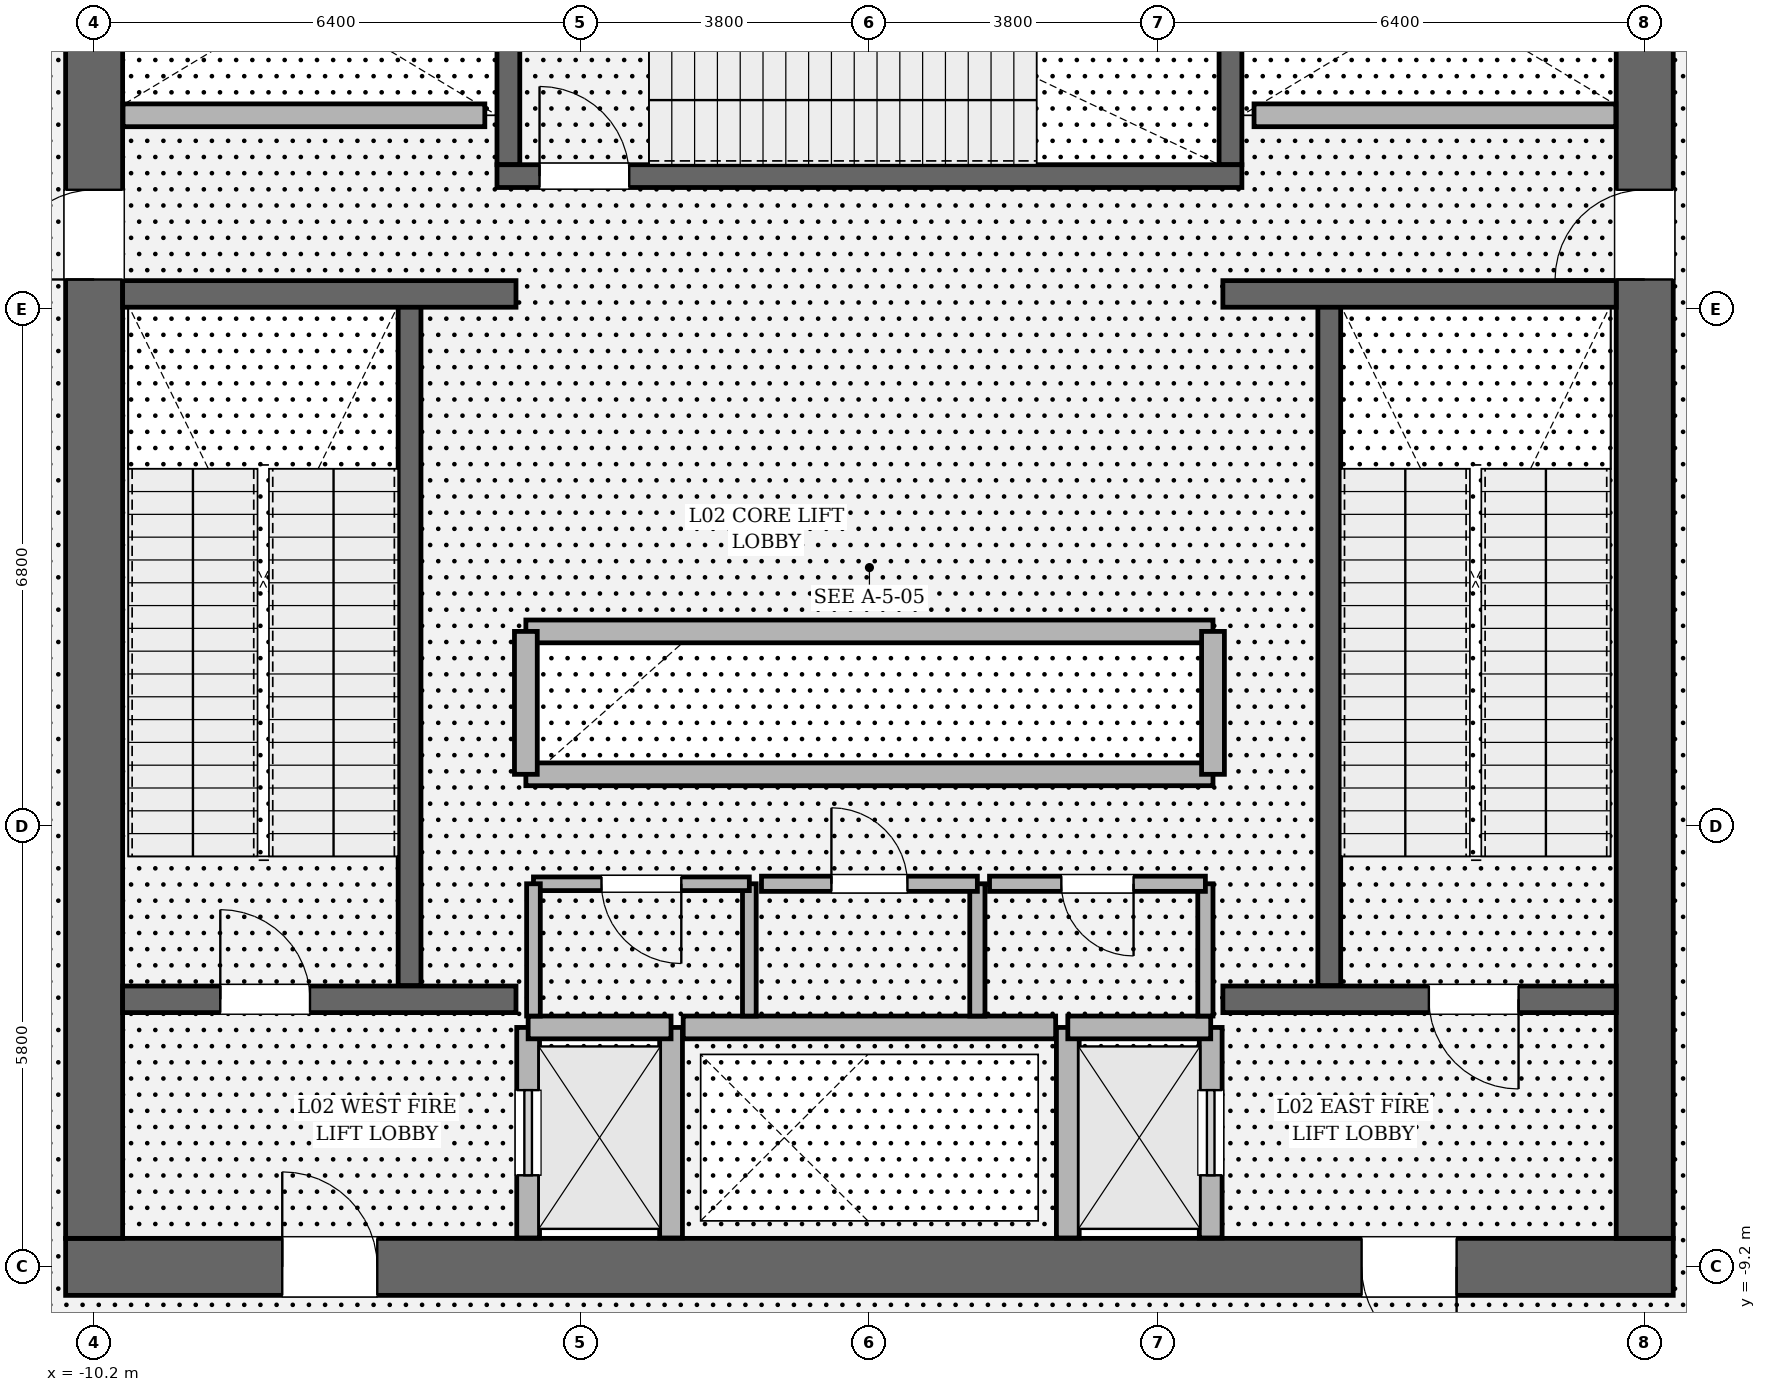
"""IFC4 building model, lengths in metres.
Left out: names, types, materials, properties, quantities, classifications, styles, units other than length and angle.
Written with IfcOpenShell. Run it as: python <this file> out.ifc"""

import sys

from ifc_helpers import new_model, si_unit, direction, frame, frame_2d, origin, place, context, subcontext, project, spatial, rectangle, extrude, element, fill, save


model = new_model("IFC4")
c1 = context("Model", 3, precision=1e-05, world=origin(), true_north=direction((0.0, 1.0)))
c2 = subcontext(c1, "Body", "Model", "MODEL_VIEW")
j1 = project(units=[si_unit("LENGTHUNIT", "METRE"), si_unit("PLANEANGLEUNIT", "RADIAN")], contexts=[c1])
p1 = place(None, origin())
s1 = spatial("IfcSite", under=j1, at=p1, CompositionType="ELEMENT")
p2 = place(p1, origin())
s2 = spatial("IfcBuilding", under=s1, at=p2, CompositionType="ELEMENT")
p3 = place(p2, frame((0.0, 0.0, 11.4)))
s3 = spatial("IfcBuildingStorey", under=s2, at=p3, CompositionType="ELEMENT", Elevation=11.4)
p4 = place(p3, frame((10.575, -9.2, 0.0), z_axis=(0.0, 0.0, 1.0), x_axis=(-1.0, 0.0, 0.0)))
e1 = element("IfcWall", 1, at=p4, inside=s3, PredefinedType="SHEAR", context=c2, shape_type="SweptSolid", body=[
    extrude(rectangle(XDim=21.15, YDim=0.75, at=frame_2d((10.575, 0.0))), origin(), (0.0, 0.0, 1.0), 5.4),
])
p5 = place(p4, frame((2.85, 0.0, 0.0)))
e2 = element("IfcOpeningElement", 2, at=p5, cuts=e1, PredefinedType="OPENING", context=c2, shape_type="SweptSolid", body=[
    extrude(rectangle(XDim=1.25, YDim=2.25, at=frame_2d((0.625, 1.125))), frame((0.0, 0.385, 0.0), z_axis=(0.0, -1.0, 0.0), x_axis=(1.0, 0.0, 0.0)), (0.0, 0.0, 1.0), 0.77),
])
p6 = place(p4, frame((17.05, 0.0, 0.0)))
e3 = element("IfcOpeningElement", 3, at=p6, cuts=e1, PredefinedType="OPENING", context=c2, shape_type="SweptSolid", body=[
    extrude(rectangle(XDim=1.25, YDim=2.25, at=frame_2d((0.625, 1.125))), frame((0.0, 0.385, 0.0), z_axis=(0.0, -1.0, 0.0), x_axis=(1.0, 0.0, 0.0)), (0.0, 0.0, 1.0), 0.77),
])
p7 = place(p3, frame((-10.2, -8.825, 0.0), z_axis=(0.0, 0.0, 1.0), x_axis=(0.0, 1.0, 0.0)))
e4 = element("IfcWall", 4, at=p7, inside=s3, PredefinedType="SHEAR", context=c2, shape_type="SweptSolid", body=[
    extrude(rectangle(XDim=17.65, YDim=0.75, at=frame_2d((8.825, 0.0))), origin(), (0.0, 0.0, 1.0), 5.4),
])
p8 = place(p7, frame((12.615, 0.0, 0.0)))
e5 = element("IfcOpeningElement", 5, at=p8, cuts=e4, PredefinedType="OPENING", context=c2, shape_type="SweptSolid", body=[
    extrude(rectangle(XDim=1.18, YDim=2.2, at=frame_2d((0.59, 1.1))), frame((0.0, 0.385, 0.0), z_axis=(0.0, -1.0, 0.0), x_axis=(1.0, 0.0, 0.0)), (0.0, 0.0, 1.0), 0.77),
])
p9 = place(p3, frame((10.2, 8.825, 0.0), z_axis=(0.0, 0.0, 1.0), x_axis=(0.0, -1.0, 0.0)))
e6 = element("IfcWall", 6, at=p9, inside=s3, PredefinedType="SHEAR", context=c2, shape_type="SweptSolid", body=[
    extrude(rectangle(XDim=17.65, YDim=0.75, at=frame_2d((8.825, 0.0))), origin(), (0.0, 0.0, 1.0), 5.4),
])
p10 = place(p9, frame((3.855, 0.0, 0.0)))
e7 = element("IfcOpeningElement", 7, at=p10, cuts=e6, PredefinedType="OPENING", context=c2, shape_type="SweptSolid", body=[
    extrude(rectangle(XDim=1.18, YDim=2.2, at=frame_2d((0.59, 1.1))), frame((0.0, 0.385, 0.0), z_axis=(0.0, -1.0, 0.0), x_axis=(1.0, 0.0, 0.0)), (0.0, 0.0, 1.0), 0.77),
])
for number, where, z_axis, x_axis in (
    (8, (-6.05, -5.5, 0.0), (0.0, 0.0, 1.0), (0.0, 1.0, 0.0)),
    (9, (6.05, 3.45, 0.0), (0.0, 0.0, 1.0), (0.0, -1.0, 0.0)),
):
    element("IfcWall", number, at=place(p3, frame(where, z_axis=z_axis, x_axis=x_axis)), inside=s3, PredefinedType="SOLIDWALL", context=c2, shape_type="SweptSolid", body=[
        extrude(rectangle(XDim=8.95, YDim=0.3, at=frame_2d((4.475, 0.0))), origin(), (0.0, 0.0, 1.0), 5.4),
    ])
for number, where, z_axis, x_axis in (
    (10, (-4.75, 5.3, 0.0), (0.0, 0.0, 1.0), (0.0, 1.0, 0.0)),
    (11, (4.75, 8.825, 0.0), (0.0, 0.0, 1.0), (0.0, -1.0, 0.0)),
):
    element("IfcWall", number, at=place(p3, frame(where, z_axis=z_axis, x_axis=x_axis)), inside=s3, PredefinedType="SOLIDWALL", context=c2, shape_type="SweptSolid", body=[
        extrude(rectangle(XDim=3.525, YDim=0.3, at=frame_2d((1.762, 0.0))), origin(), (0.0, 0.0, 1.0), 5.4),
    ])
p11 = place(p3, frame((-4.9, 5.15, 0.0), z_axis=(0.0, 0.0, 1.0), x_axis=(1.0, 0.0, 0.0)))
e12 = element("IfcWall", 12, at=p11, inside=s3, PredefinedType="SOLIDWALL", context=c2, shape_type="SweptSolid", body=[
    extrude(rectangle(XDim=9.8, YDim=0.3, at=frame_2d((4.9, 0.0))), origin(), (0.0, 0.0, 1.0), 5.4),
])
p12 = place(p11, frame((0.56, 0.0, 0.0)))
e13 = element("IfcOpeningElement", 13, at=p12, cuts=e12, PredefinedType="OPENING", context=c2, shape_type="SweptSolid", body=[
    extrude(rectangle(XDim=1.18, YDim=2.2, at=frame_2d((0.59, 1.1))), frame((0.0, 0.16, 0.0), z_axis=(0.0, -1.0, 0.0), x_axis=(1.0, 0.0, 0.0)), (0.0, 0.0, 1.0), 0.32),
])
p13 = place(p3, frame((-9.825, -5.68, 0.0), z_axis=(0.0, 0.0, 1.0), x_axis=(1.0, 0.0, 0.0)))
e14 = element("IfcWall", 14, at=p13, inside=s3, PredefinedType="SOLIDWALL", context=c2, shape_type="SweptSolid", body=[
    extrude(rectangle(XDim=5.175, YDim=0.35, at=frame_2d((2.587, 0.0))), origin(), (0.0, 0.0, 1.0), 5.4),
])
p14 = place(p13, frame((1.285, 0.0, 0.0)))
e15 = element("IfcOpeningElement", 15, at=p14, cuts=e14, PredefinedType="OPENING", context=c2, shape_type="SweptSolid", body=[
    extrude(rectangle(XDim=1.18, YDim=2.2, at=frame_2d((0.59, 1.1))), frame((0.0, 0.185, 0.0), z_axis=(0.0, -1.0, 0.0), x_axis=(1.0, 0.0, 0.0)), (0.0, 0.0, 1.0), 0.37),
])
p15 = place(p3, frame((4.65, -5.68, 0.0), z_axis=(0.0, 0.0, 1.0), x_axis=(1.0, 0.0, 0.0)))
e16 = element("IfcWall", 16, at=p15, inside=s3, PredefinedType="SOLIDWALL", context=c2, shape_type="SweptSolid", body=[
    extrude(rectangle(XDim=5.175, YDim=0.35, at=frame_2d((2.587, 0.0))), origin(), (0.0, 0.0, 1.0), 5.4),
])
p16 = place(p15, frame((2.71, 0.0, 0.0)))
e17 = element("IfcOpeningElement", 17, at=p16, cuts=e16, PredefinedType="OPENING", context=c2, shape_type="SweptSolid", body=[
    extrude(rectangle(XDim=1.18, YDim=2.2, at=frame_2d((0.59, 1.1))), frame((0.0, 0.185, 0.0), z_axis=(0.0, -1.0, 0.0), x_axis=(1.0, 0.0, 0.0)), (0.0, 0.0, 1.0), 0.37),
])
for number, where, z_axis, x_axis in (
    (18, (-9.825, 3.6, 0.0), (0.0, 0.0, 1.0), (1.0, 0.0, 0.0)),
    (19, (4.65, 3.6, 0.0), (0.0, 0.0, 1.0), (1.0, 0.0, 0.0)),
):
    element("IfcWall", number, at=place(p3, frame(where, z_axis=z_axis, x_axis=x_axis)), inside=s3, PredefinedType="SOLIDWALL", context=c2, shape_type="SweptSolid", body=[
        extrude(rectangle(XDim=5.175, YDim=0.35, at=frame_2d((2.587, 0.0))), origin(), (0.0, 0.0, 1.0), 5.4),
    ])
p17 = place(p3, frame((-4.49, -8.82, 0.0), z_axis=(0.0, 0.0, 1.0), x_axis=(0.0, 1.0, 0.0)))
e20 = element("IfcWall", 20, at=p17, inside=s3, PredefinedType="SOLIDWALL", context=c2, shape_type="SweptSolid", body=[
    extrude(rectangle(XDim=2.77, YDim=0.3, at=frame_2d((1.385, 0.0))), origin(), (0.0, 0.0, 1.0), 5.12),
])
p18 = place(p17, frame((0.825, 0.0, 0.0)))
e21 = element("IfcOpeningElement", 21, at=p18, cuts=e20, PredefinedType="OPENING", context=c2, shape_type="SweptSolid", body=[
    extrude(rectangle(XDim=1.12, YDim=2.25, at=frame_2d((0.56, 1.125))), frame((0.0, 0.16, 0.0), z_axis=(0.0, -1.0, 0.0), x_axis=(1.0, 0.0, 0.0)), (0.0, 0.0, 1.0), 0.32),
])
p19 = place(p3, frame((-2.61, -8.82, 0.0), z_axis=(0.0, 0.0, 1.0), x_axis=(0.0, 1.0, 0.0)))
e22 = element("IfcWall", 22, at=p19, inside=s3, PredefinedType="SOLIDWALL", context=c2, shape_type="SweptSolid", body=[
    extrude(rectangle(XDim=2.77, YDim=0.3, at=frame_2d((1.385, 0.0))), origin(), (0.0, 0.0, 1.0), 5.12),
])
p20 = place(p3, frame((-4.49, -6.05, 0.0), z_axis=(0.0, 0.0, 1.0), x_axis=(1.0, 0.0, 0.0)))
e23 = element("IfcWall", 23, at=p20, inside=s3, PredefinedType="SOLIDWALL", context=c2, shape_type="SweptSolid", body=[
    extrude(rectangle(XDim=1.88, YDim=0.3, at=frame_2d((0.94, 0.0))), origin(), (0.0, 0.0, 1.0), 5.12),
])
p21 = place(p3, frame((4.49, -8.82, 0.0), z_axis=(0.0, 0.0, 1.0), x_axis=(0.0, 1.0, 0.0)))
e24 = element("IfcWall", 24, at=p21, inside=s3, PredefinedType="SOLIDWALL", context=c2, shape_type="SweptSolid", body=[
    extrude(rectangle(XDim=2.77, YDim=0.3, at=frame_2d((1.385, 0.0))), origin(), (0.0, 0.0, 1.0), 5.12),
])
p22 = place(p21, frame((0.825, 0.0, 0.0)))
e25 = element("IfcOpeningElement", 25, at=p22, cuts=e24, PredefinedType="OPENING", context=c2, shape_type="SweptSolid", body=[
    extrude(rectangle(XDim=1.12, YDim=2.25, at=frame_2d((0.56, 1.125))), frame((0.0, 0.16, 0.0), z_axis=(0.0, -1.0, 0.0), x_axis=(1.0, 0.0, 0.0)), (0.0, 0.0, 1.0), 0.32),
])
p23 = place(p3, frame((2.61, -8.82, 0.0), z_axis=(0.0, 0.0, 1.0), x_axis=(0.0, 1.0, 0.0)))
e26 = element("IfcWall", 26, at=p23, inside=s3, PredefinedType="SOLIDWALL", context=c2, shape_type="SweptSolid", body=[
    extrude(rectangle(XDim=2.77, YDim=0.3, at=frame_2d((1.385, 0.0))), origin(), (0.0, 0.0, 1.0), 5.12),
])
p24 = place(p3, frame((2.61, -6.05, 0.0), z_axis=(0.0, 0.0, 1.0), x_axis=(1.0, 0.0, 0.0)))
e27 = element("IfcWall", 27, at=p24, inside=s3, PredefinedType="SOLIDWALL", context=c2, shape_type="SweptSolid", body=[
    extrude(rectangle(XDim=1.88, YDim=0.3, at=frame_2d((0.94, 0.0))), origin(), (0.0, 0.0, 1.0), 5.12),
])
for number, where, z_axis, x_axis in (
    (28, (-4.52, -0.84, 0.0), (0.0, 0.0, 1.0), (1.0, 0.0, 0.0)),
    (29, (-4.52, -2.72, 0.0), (0.0, 0.0, 1.0), (1.0, 0.0, 0.0)),
):
    element("IfcWall", number, at=place(p3, frame(where, z_axis=z_axis, x_axis=x_axis)), inside=s3, PredefinedType="SOLIDWALL", context=c2, shape_type="SweptSolid", body=[
        extrude(rectangle(XDim=9.04, YDim=0.3, at=frame_2d((4.52, 0.0))), origin(), (0.0, 0.0, 1.0), 5.12),
    ])
for number, where, z_axis, x_axis in (
    (30, (-4.52, -2.72, 0.0), (0.0, 0.0, 1.0), (0.0, 1.0, 0.0)),
    (31, (4.52, -2.72, 0.0), (0.0, 0.0, 1.0), (0.0, 1.0, 0.0)),
):
    element("IfcWall", number, at=place(p3, frame(where, z_axis=z_axis, x_axis=x_axis)), inside=s3, PredefinedType="SOLIDWALL", context=c2, shape_type="SweptSolid", body=[
        extrude(rectangle(XDim=1.88, YDim=0.3, at=frame_2d((0.94, 0.0))), origin(), (0.0, 0.0, 1.0), 5.12),
    ])
for number, where, z_axis, x_axis in (
    (32, (-9.82, 5.95, 0.0), (0.0, 0.0, 1.0), (1.0, 0.0, 0.0)),
    (33, (5.06, 5.95, 0.0), (0.0, 0.0, 1.0), (1.0, 0.0, 0.0)),
):
    element("IfcWall", number, at=place(p3, frame(where, z_axis=z_axis, x_axis=x_axis)), inside=s3, PredefinedType="SOLIDWALL", context=c2, shape_type="SweptSolid", body=[
        extrude(rectangle(XDim=4.76, YDim=0.3, at=frame_2d((2.38, 0.0))), origin(), (0.0, 0.0, 1.0), 5.12),
    ])
p25 = place(p3, frame((-2.45, -6.05, 0.0), z_axis=(0.0, 0.0, 1.0), x_axis=(1.0, 0.0, 0.0)))
e34 = element("IfcWall", 34, at=p25, inside=s3, PredefinedType="SOLIDWALL", context=c2, shape_type="SweptSolid", body=[
    extrude(rectangle(XDim=4.9, YDim=0.3, at=frame_2d((2.45, 0.0))), origin(), (0.0, 0.0, 1.0), 5.12),
])
p26 = place(p3, frame((-1.58, -5.9, 0.0), z_axis=(0.0, 0.0, 1.0), x_axis=(0.0, 1.0, 0.0)))
e35 = element("IfcWall", 35, at=p26, inside=s3, PredefinedType="PARTITIONING", context=c2, shape_type="SweptSolid", body=[
    extrude(rectangle(XDim=1.74, YDim=0.18, at=frame_2d((0.87, 0.0))), origin(), (0.0, 0.0, 1.0), 5.12),
])
p27 = place(p3, frame((-1.58, -4.16, 0.0), z_axis=(0.0, 0.0, 1.0), x_axis=(-1.0, 0.0, 0.0)))
e36 = element("IfcWall", 36, at=p27, inside=s3, PredefinedType="PARTITIONING", context=c2, shape_type="SweptSolid", body=[
    extrude(rectangle(XDim=2.84, YDim=0.18, at=frame_2d((1.42, 0.0))), origin(), (0.0, 0.0, 1.0), 5.12),
])
p28 = place(p27, frame((0.895, 0.0, 0.0)))
e37 = element("IfcOpeningElement", 37, at=p28, cuts=e36, PredefinedType="OPENING", context=c2, shape_type="SweptSolid", body=[
    extrude(rectangle(XDim=1.05, YDim=2.2, at=frame_2d((0.525, 1.1))), frame((0.0, 0.1, 0.0), z_axis=(0.0, -1.0, 0.0), x_axis=(1.0, 0.0, 0.0)), (0.0, 0.0, 1.0), 0.2),
])
p29 = place(p3, frame((-4.42, -4.16, 0.0), z_axis=(0.0, 0.0, 1.0), x_axis=(0.0, -1.0, 0.0)))
e38 = element("IfcWall", 38, at=p29, inside=s3, PredefinedType="PARTITIONING", context=c2, shape_type="SweptSolid", body=[
    extrude(rectangle(XDim=1.74, YDim=0.18, at=frame_2d((0.87, 0.0))), origin(), (0.0, 0.0, 1.0), 5.12),
])
p30 = place(p3, frame((1.42, -5.9, 0.0), z_axis=(0.0, 0.0, 1.0), x_axis=(0.0, 1.0, 0.0)))
e39 = element("IfcWall", 39, at=p30, inside=s3, PredefinedType="SOLIDWALL", context=c2, shape_type="SweptSolid", body=[
    extrude(rectangle(XDim=1.74, YDim=0.2, at=frame_2d((0.87, 0.0))), origin(), (0.0, 0.0, 1.0), 5.12),
])
p31 = place(p3, frame((1.42, -4.16, 0.0), z_axis=(0.0, 0.0, 1.0), x_axis=(-1.0, 0.0, 0.0)))
e40 = element("IfcWall", 40, at=p31, inside=s3, PredefinedType="SOLIDWALL", context=c2, shape_type="SweptSolid", body=[
    extrude(rectangle(XDim=2.84, YDim=0.2, at=frame_2d((1.42, 0.0))), origin(), (0.0, 0.0, 1.0), 5.12),
])
p32 = place(p31, frame((0.92, 0.0, 0.0)))
e41 = element("IfcOpeningElement", 41, at=p32, cuts=e40, PredefinedType="OPENING", context=c2, shape_type="SweptSolid", body=[
    extrude(rectangle(XDim=1.0, YDim=2.15, at=frame_2d((0.5, 1.075))), frame((0.0, 0.11, 0.0), z_axis=(0.0, -1.0, 0.0), x_axis=(1.0, 0.0, 0.0)), (0.0, 0.0, 1.0), 0.22),
])
p33 = place(p3, frame((4.42, -5.9, 0.0), z_axis=(0.0, 0.0, 1.0), x_axis=(0.0, 1.0, 0.0)))
e42 = element("IfcWall", 42, at=p33, inside=s3, PredefinedType="SOLIDWALL", context=c2, shape_type="SweptSolid", body=[
    extrude(rectangle(XDim=1.74, YDim=0.2, at=frame_2d((0.87, 0.0))), origin(), (0.0, 0.0, 1.0), 5.12),
])
p34 = place(p3, frame((4.42, -4.16, 0.0), z_axis=(0.0, 0.0, 1.0), x_axis=(-1.0, 0.0, 0.0)))
e43 = element("IfcWall", 43, at=p34, inside=s3, PredefinedType="SOLIDWALL", context=c2, shape_type="SweptSolid", body=[
    extrude(rectangle(XDim=2.84, YDim=0.2, at=frame_2d((1.42, 0.0))), origin(), (0.0, 0.0, 1.0), 5.12),
])
p35 = place(p34, frame((0.945, 0.0, 0.0)))
e44 = element("IfcOpeningElement", 44, at=p35, cuts=e43, PredefinedType="OPENING", context=c2, shape_type="SweptSolid", body=[
    extrude(rectangle(XDim=0.95, YDim=2.15, at=frame_2d((0.475, 1.075))), frame((0.0, 0.11, 0.0), z_axis=(0.0, -1.0, 0.0), x_axis=(1.0, 0.0, 0.0)), (0.0, 0.0, 1.0), 0.22),
])
p36 = place(p14, origin())
e45 = element("IfcDoor", 45, at=p36, inside=s3, OperationType="SINGLE_SWING_LEFT", PredefinedType="DOOR", context=c2, shape_type="SweptSolid", body=[
    extrude(rectangle(XDim=1.18, YDim=2.2, at=frame_2d((0.59, 1.1))), frame((0.0, 0.025, 0.0), z_axis=(0.0, -1.0, 0.0), x_axis=(1.0, 0.0, 0.0)), (0.0, 0.0, 1.0), 0.05),
])
fill(e15, e45)
p37 = place(p16, origin())
e46 = element("IfcDoor", 46, at=p37, inside=s3, OperationType="SINGLE_SWING_RIGHT", PredefinedType="DOOR", context=c2, shape_type="SweptSolid", body=[
    extrude(rectangle(XDim=1.18, YDim=2.2, at=frame_2d((0.59, 1.1))), frame((0.0, 0.025, 0.0), z_axis=(0.0, -1.0, 0.0), x_axis=(1.0, 0.0, 0.0)), (0.0, 0.0, 1.0), 0.05),
])
fill(e17, e46)
p38 = place(p12, origin())
e47 = element("IfcDoor", 47, at=p38, inside=s3, OperationType="SINGLE_SWING_LEFT", PredefinedType="DOOR", context=c2, shape_type="SweptSolid", body=[
    extrude(rectangle(XDim=1.18, YDim=2.2, at=frame_2d((0.59, 1.1))), frame((0.0, 0.025, 0.0), z_axis=(0.0, -1.0, 0.0), x_axis=(1.0, 0.0, 0.0)), (0.0, 0.0, 1.0), 0.05),
])
fill(e13, e47)
p39 = place(p5, origin())
e48 = element("IfcDoor", 48, at=p39, inside=s3, OperationType="SINGLE_SWING_LEFT", PredefinedType="DOOR", context=c2, shape_type="SweptSolid", body=[
    extrude(rectangle(XDim=1.25, YDim=2.25, at=frame_2d((0.625, 1.125))), frame((0.0, 0.025, 0.0), z_axis=(0.0, -1.0, 0.0), x_axis=(1.0, 0.0, 0.0)), (0.0, 0.0, 1.0), 0.05),
])
fill(e2, e48)
p40 = place(p6, origin())
e49 = element("IfcDoor", 49, at=p40, inside=s3, OperationType="SINGLE_SWING_RIGHT", PredefinedType="DOOR", context=c2, shape_type="SweptSolid", body=[
    extrude(rectangle(XDim=1.25, YDim=2.25, at=frame_2d((0.625, 1.125))), frame((0.0, 0.025, 0.0), z_axis=(0.0, -1.0, 0.0), x_axis=(1.0, 0.0, 0.0)), (0.0, 0.0, 1.0), 0.05),
])
fill(e3, e49)
p41 = place(p8, origin())
e50 = element("IfcDoor", 50, at=p41, inside=s3, OperationType="SINGLE_SWING_LEFT", PredefinedType="DOOR", context=c2, shape_type="SweptSolid", body=[
    extrude(rectangle(XDim=1.18, YDim=2.2, at=frame_2d((0.59, 1.1))), frame((0.0, 0.025, 0.0), z_axis=(0.0, -1.0, 0.0), x_axis=(1.0, 0.0, 0.0)), (0.0, 0.0, 1.0), 0.05),
])
fill(e5, e50)
p42 = place(p10, origin())
e51 = element("IfcDoor", 51, at=p42, inside=s3, OperationType="SINGLE_SWING_RIGHT", PredefinedType="DOOR", context=c2, shape_type="SweptSolid", body=[
    extrude(rectangle(XDim=1.18, YDim=2.2, at=frame_2d((0.59, 1.1))), frame((0.0, 0.025, 0.0), z_axis=(0.0, -1.0, 0.0), x_axis=(1.0, 0.0, 0.0)), (0.0, 0.0, 1.0), 0.05),
])
fill(e7, e51)
p43 = place(p18, origin())
e52 = element("IfcDoor", 52, at=p43, inside=s3, OperationType="SLIDING_TO_LEFT", PredefinedType="DOOR", context=c2, shape_type="SweptSolid", body=[
    extrude(rectangle(XDim=1.12, YDim=2.25, at=frame_2d((0.56, 1.125))), frame((0.0, 0.025, 0.0), z_axis=(0.0, -1.0, 0.0), x_axis=(1.0, 0.0, 0.0)), (0.0, 0.0, 1.0), 0.05),
])
fill(e21, e52)
p44 = place(p22, origin())
e53 = element("IfcDoor", 53, at=p44, inside=s3, OperationType="SLIDING_TO_RIGHT", PredefinedType="DOOR", context=c2, shape_type="SweptSolid", body=[
    extrude(rectangle(XDim=1.12, YDim=2.25, at=frame_2d((0.56, 1.125))), frame((0.0, 0.025, 0.0), z_axis=(0.0, -1.0, 0.0), x_axis=(1.0, 0.0, 0.0)), (0.0, 0.0, 1.0), 0.05),
])
fill(e25, e53)
p45 = place(p28, origin())
e54 = element("IfcDoor", 54, at=p45, inside=s3, OperationType="SINGLE_SWING_LEFT", PredefinedType="DOOR", context=c2, shape_type="SweptSolid", body=[
    extrude(rectangle(XDim=1.05, YDim=2.2, at=frame_2d((0.525, 1.1))), frame((0.0, 0.025, 0.0), z_axis=(0.0, -1.0, 0.0), x_axis=(1.0, 0.0, 0.0)), (0.0, 0.0, 1.0), 0.05),
])
fill(e37, e54)
p46 = place(p32, origin())
e55 = element("IfcDoor", 55, at=p46, inside=s3, OperationType="SINGLE_SWING_RIGHT", PredefinedType="DOOR", context=c2, shape_type="SweptSolid", body=[
    extrude(rectangle(XDim=1.0, YDim=2.15, at=frame_2d((0.5, 1.075))), frame((0.0, 0.025, 0.0), z_axis=(0.0, -1.0, 0.0), x_axis=(1.0, 0.0, 0.0)), (0.0, 0.0, 1.0), 0.05),
])
fill(e41, e55)
p47 = place(p35, origin())
e56 = element("IfcDoor", 56, at=p47, inside=s3, OperationType="SINGLE_SWING_LEFT", PredefinedType="DOOR", context=c2, shape_type="SweptSolid", body=[
    extrude(rectangle(XDim=0.95, YDim=2.15, at=frame_2d((0.475, 1.075))), frame((0.0, 0.025, 0.0), z_axis=(0.0, -1.0, 0.0), x_axis=(1.0, 0.0, 0.0)), (0.0, 0.0, 1.0), 0.05),
])
fill(e44, e56)
save(model, sys.argv[1])
